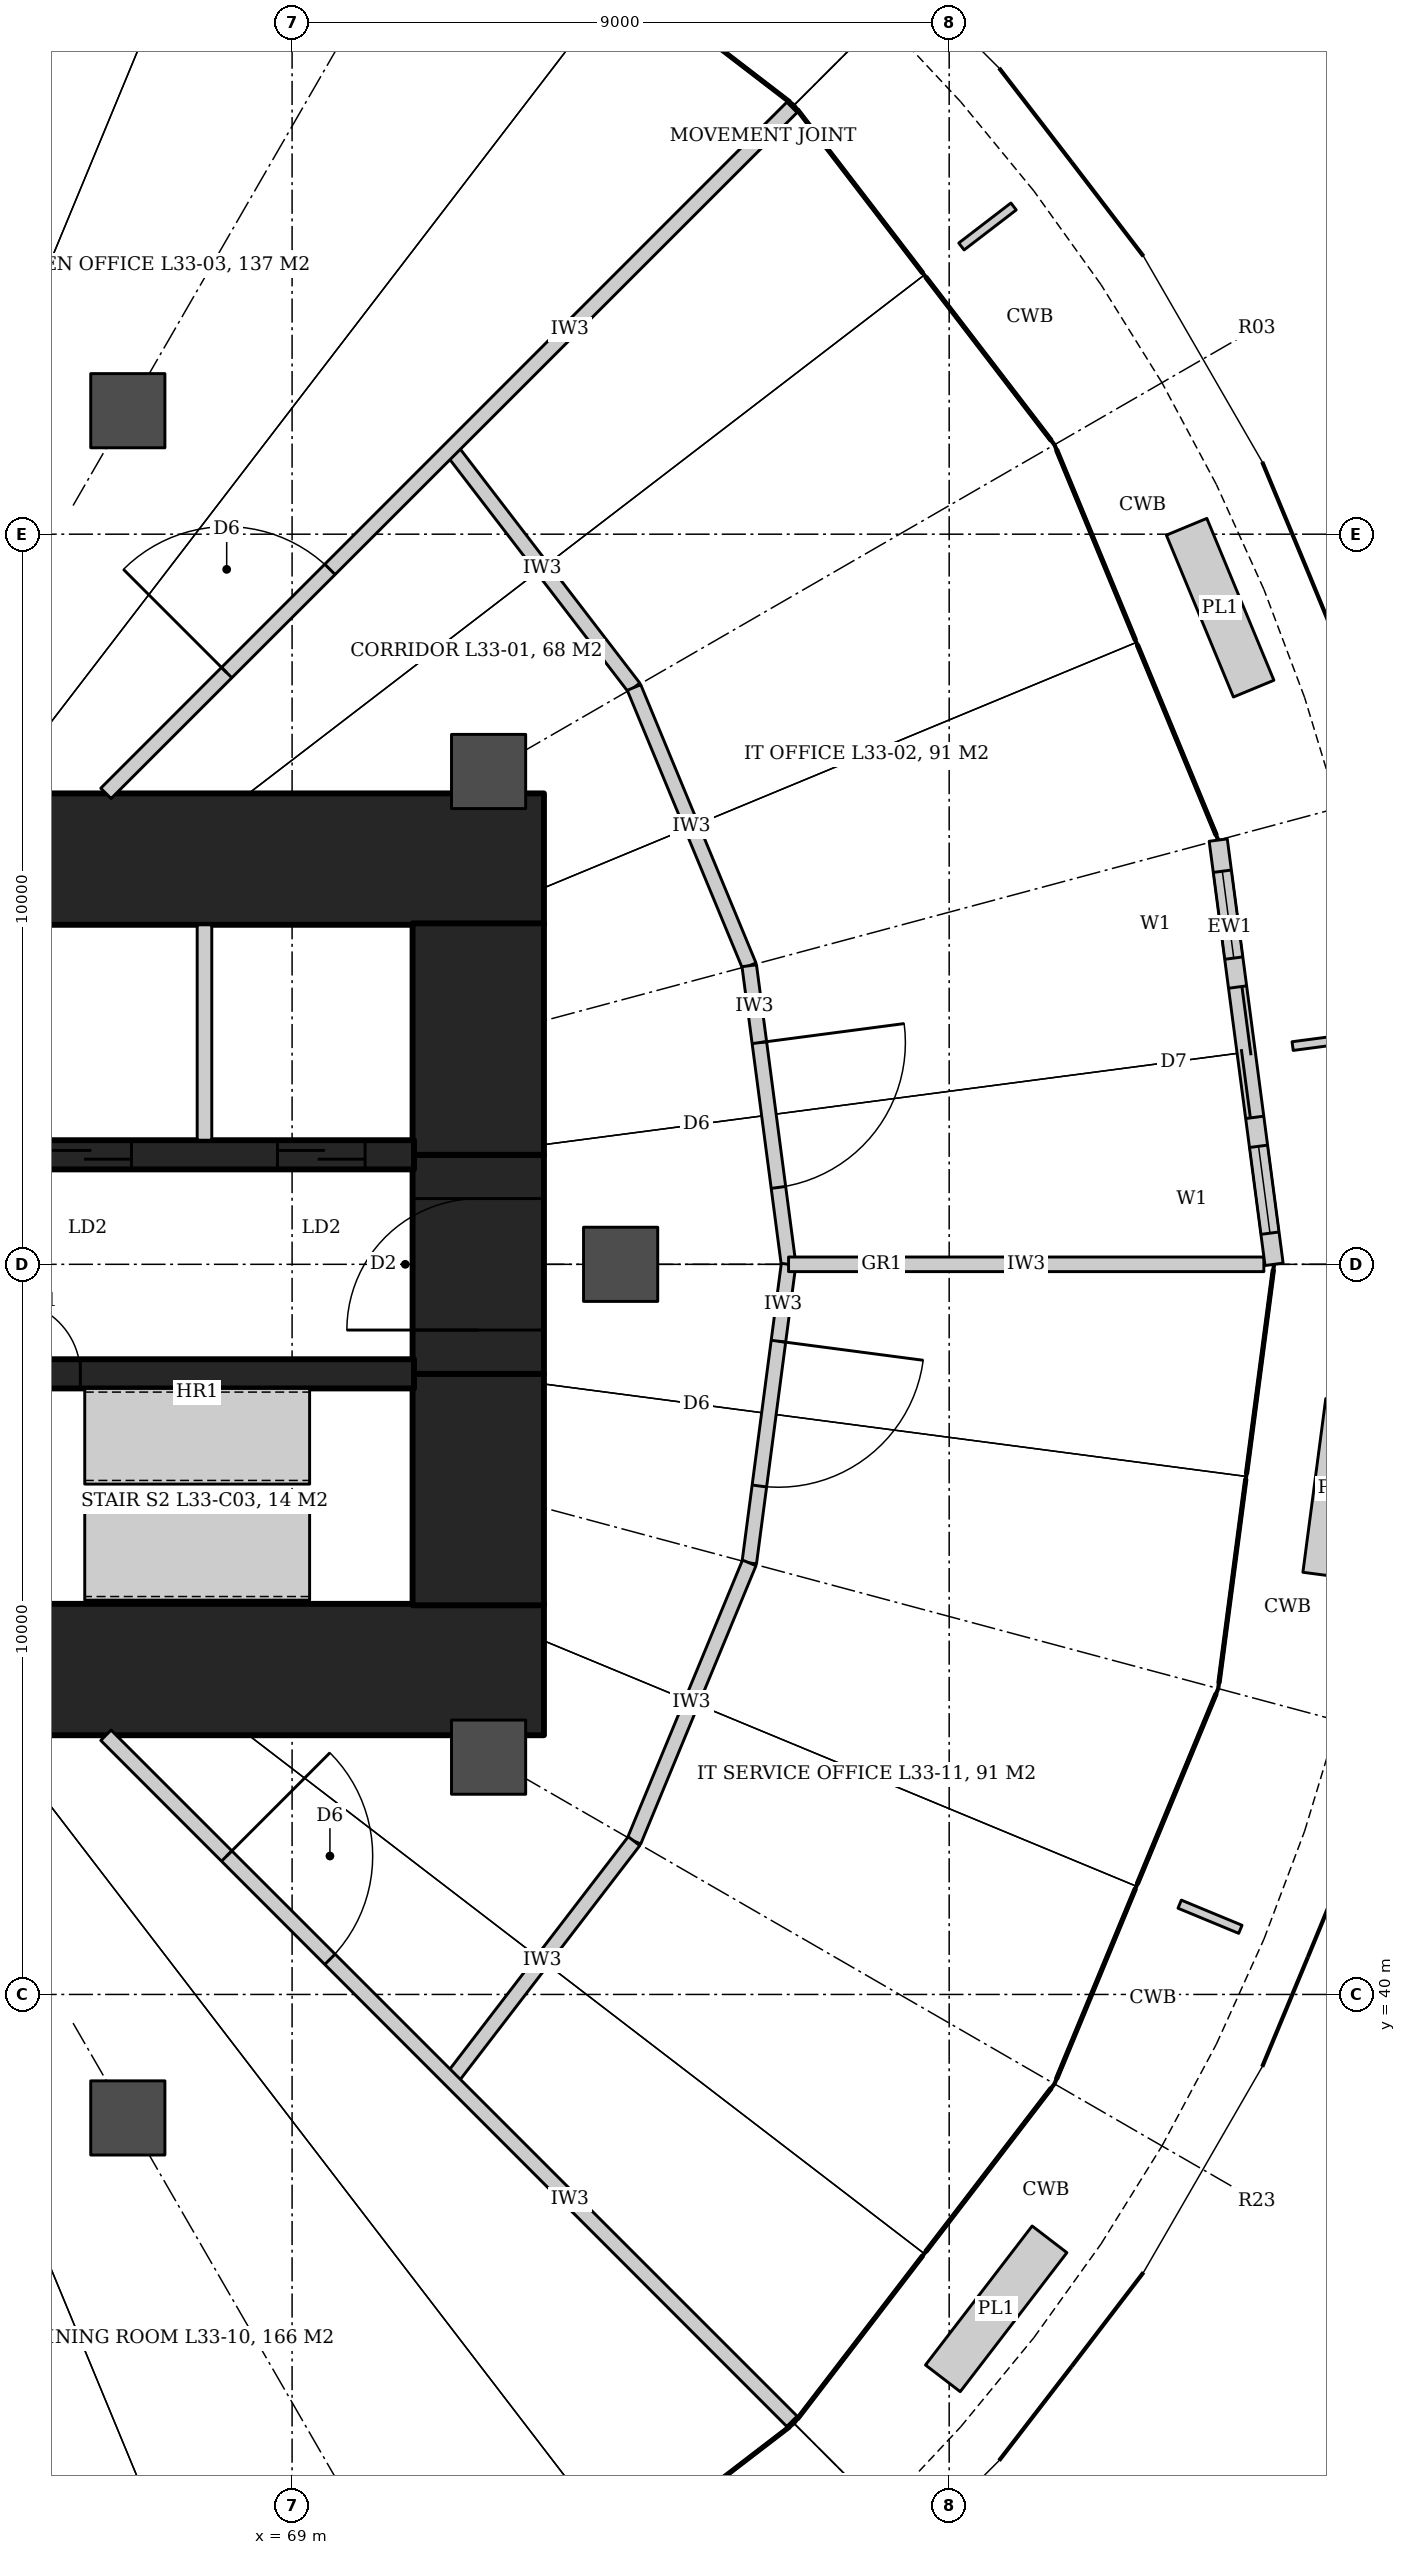
"""IFC4 building model, lengths in metres.
Left out: names, types, materials, properties, quantities, classifications, styles, units other than length and angle.
Written with IfcOpenShell. Run it as: python <this file> out.ifc"""

import sys

from ifc_helpers import new_model, si_unit, direction, frame, frame_2d, origin, origin_2d, place, context, subcontext, project, spatial, rectangle, hollow_circle, extrude, element, fill, save


model = new_model("IFC4")
c1 = context("Model", 3, precision=1e-05, world=origin(), true_north=direction((0.0, 1.0)))
c2 = subcontext(c1, "Body", "Model", "MODEL_VIEW")
j1 = project(units=[si_unit("LENGTHUNIT", "METRE"), si_unit("PLANEANGLEUNIT", "RADIAN")], contexts=[c1])
p1 = place(None, origin())
s1 = spatial("IfcSite", under=j1, at=p1, CompositionType="ELEMENT")
p2 = place(p1, origin())
s2 = spatial("IfcBuilding", under=s1, at=p2, CompositionType="ELEMENT")
p3 = place(p2, frame((0.0, 0.0, 147.8)))
s3 = spatial("IfcBuildingStorey", under=s2, at=p3, CompositionType="ELEMENT", Elevation=147.8)
for number, where, z_axis, x_axis in (
    (1, (64.6, 55.55, 0.0), (0.0, 0.0, 1.0), (1.0, 0.0, 0.0)),
    (2, (64.6, 44.45, 0.0), (0.0, 0.0, 1.0), (1.0, 0.0, 0.0)),
):
    element("IfcWall", number, at=place(p3, frame(where, z_axis=z_axis, x_axis=x_axis)), inside=s3, PredefinedType="SHEAR", context=c2, shape_type="SweptSolid", body=[
        extrude(rectangle(XDim=7.85, YDim=1.8, at=frame_2d((3.925, 0.0))), origin(), (0.0, 0.0, 1.0), 4.2),
    ])
p4 = place(p3, frame((71.55, 45.33, 0.0), z_axis=(0.0, 0.0, 1.0), x_axis=(0.0, 1.0, 0.0)))
e3 = element("IfcWall", 3, at=p4, inside=s3, PredefinedType="SHEAR", context=c2, shape_type="SweptSolid", body=[
    extrude(rectangle(XDim=3.17, YDim=1.8, at=frame_2d((1.585, 0.0))), origin(), (0.0, 0.0, 1.0), 4.2),
])
p5 = place(p3, frame((71.55, 48.5, 0.0), z_axis=(0.0, 0.0, 1.0), x_axis=(0.0, 1.0, 0.0)))
e4 = element("IfcWall", 4, at=p5, inside=s3, PredefinedType="SHEAR", context=c2, shape_type="SweptSolid", body=[
    extrude(rectangle(XDim=3.0, YDim=1.8, at=frame_2d((1.5, 0.0))), origin(), (0.0, 0.0, 1.0), 4.2),
])
p6 = place(p5, frame((0.6, 0.0, 0.0)))
e5 = element("IfcOpeningElement", 5, at=p6, cuts=e4, PredefinedType="OPENING", context=c2, shape_type="SweptSolid", body=[
    extrude(rectangle(XDim=1.8, YDim=2.1, at=frame_2d((0.9, 1.05))), frame((0.0, 0.91, 0.0), z_axis=(0.0, -1.0, 0.0), x_axis=(1.0, 0.0, 0.0)), (0.0, 0.0, 1.0), 1.82),
])
p7 = place(p3, frame((71.55, 51.5, 0.0), z_axis=(0.0, 0.0, 1.0), x_axis=(0.0, 1.0, 0.0)))
e6 = element("IfcWall", 6, at=p7, inside=s3, PredefinedType="SHEAR", context=c2, shape_type="SweptSolid", body=[
    extrude(rectangle(XDim=3.17, YDim=1.8, at=frame_2d((1.585, 0.0))), origin(), (0.0, 0.0, 1.0), 4.2),
])
p8 = place(p3, frame((64.6, 51.5, 0.0), z_axis=(0.0, 0.0, 1.0), x_axis=(1.0, 0.0, 0.0)))
e7 = element("IfcWall", 7, at=p8, inside=s3, PredefinedType="SHEAR", context=c2, shape_type="SweptSolid", body=[
    extrude(rectangle(XDim=6.07, YDim=0.4, at=frame_2d((3.035, 0.0))), origin(), (0.0, 0.0, 1.0), 4.2),
])
p9 = place(p8, frame((1.0, 0.0, 0.0)))
e8 = element("IfcOpeningElement", 8, at=p9, cuts=e7, PredefinedType="OPENING", context=c2, shape_type="SweptSolid", body=[
    extrude(rectangle(XDim=1.2, YDim=2.1, at=frame_2d((0.6, 1.05))), frame((0.0, 0.21, 0.0), z_axis=(0.0, -1.0, 0.0), x_axis=(1.0, 0.0, 0.0)), (0.0, 0.0, 1.0), 0.42),
])
p10 = place(p8, frame((4.2, 0.0, 0.0)))
e9 = element("IfcOpeningElement", 9, at=p10, cuts=e7, PredefinedType="OPENING", context=c2, shape_type="SweptSolid", body=[
    extrude(rectangle(XDim=1.2, YDim=2.1, at=frame_2d((0.6, 1.05))), frame((0.0, 0.21, 0.0), z_axis=(0.0, -1.0, 0.0), x_axis=(1.0, 0.0, 0.0)), (0.0, 0.0, 1.0), 0.42),
])
p11 = place(p3, frame((64.6, 48.5, 0.0), z_axis=(0.0, 0.0, 1.0), x_axis=(1.0, 0.0, 0.0)))
e10 = element("IfcWall", 10, at=p11, inside=s3, PredefinedType="SHEAR", context=c2, shape_type="SweptSolid", body=[
    extrude(rectangle(XDim=6.07, YDim=0.4, at=frame_2d((3.035, 0.0))), origin(), (0.0, 0.0, 1.0), 4.2),
])
p12 = place(p11, frame((0.5, 0.0, 0.0)))
e11 = element("IfcOpeningElement", 11, at=p12, cuts=e10, PredefinedType="OPENING", context=c2, shape_type="SweptSolid", body=[
    extrude(rectangle(XDim=1.0, YDim=2.1, at=frame_2d((0.5, 1.05))), frame((0.0, 0.21, 0.0), z_axis=(0.0, -1.0, 0.0), x_axis=(1.0, 0.0, 0.0)), (0.0, 0.0, 1.0), 0.42),
])
for number, where, z_axis, x_axis in (
    (12, (73.5, 50.0, 0.0), (0.0, 0.0, 1.0), (1.0, 0.0, 0.0)),
    (13, (71.691, 56.75, 0.0), (0.0, 0.0, 1.0), (1.0, 0.0, 0.0)),
    (14, (66.75, 61.691, 0.0), (0.0, 0.0, 1.0), (1.0, 0.0, 0.0)),
    (15, (66.75, 38.309, 0.0), (0.0, 0.0, 1.0), (1.0, 0.0, 0.0)),
    (16, (71.691, 43.25, 0.0), (0.0, 0.0, 1.0), (1.0, 0.0, 0.0)),
):
    element("IfcColumn", number, at=place(p3, frame(where, z_axis=z_axis, x_axis=x_axis)), inside=s3, PredefinedType="COLUMN", context=c2, shape_type="SweptSolid", body=[
        extrude(hollow_circle(Radius=0.508, WallThickness=0.05, at=origin_2d()), origin(), (0.0, 0.0, 1.0), 4.2),
    ])
p13 = place(p3, frame((71.172, 61.172, 0.0), z_axis=(0.0, 0.0, 1.0), x_axis=(0.608714823874, -0.793389099494, 0.0)))
e17 = element("IfcWall", 17, at=p13, inside=s3, PredefinedType="PARTITIONING", context=c2, shape_type="SweptSolid", body=[
    extrude(rectangle(XDim=4.125, YDim=0.2, at=frame_2d((2.062, 0.0))), origin(), (0.0, 0.0, 1.0), 3.04),
])
p14 = place(p3, frame((73.683, 57.9, 0.0), z_axis=(0.0, 0.0, 1.0), x_axis=(0.382731667114, -0.923859551549, 0.0)))
e18 = element("IfcWall", 18, at=p14, inside=s3, PredefinedType="PARTITIONING", context=c2, shape_type="SweptSolid", body=[
    extrude(rectangle(XDim=4.125, YDim=0.2, at=frame_2d((2.062, 0.0))), origin(), (0.0, 0.0, 1.0), 3.04),
])
p15 = place(p3, frame((75.262, 54.089, 0.0), z_axis=(0.0, 0.0, 1.0), x_axis=(0.130515758099, -0.991446234996, 0.0)))
e19 = element("IfcWall", 19, at=p15, inside=s3, PredefinedType="PARTITIONING", context=c2, shape_type="SweptSolid", body=[
    extrude(rectangle(XDim=4.125, YDim=0.2, at=frame_2d((2.062, 0.0))), origin(), (0.0, 0.0, 1.0), 3.04),
])
p16 = place(p15, frame((1.062, 0.0, 0.0)))
e20 = element("IfcOpeningElement", 20, at=p16, cuts=e19, PredefinedType="OPENING", context=c2, shape_type="SweptSolid", body=[
    extrude(rectangle(XDim=2.0, YDim=2.1, at=frame_2d((1.0, 1.05))), frame((0.0, 0.11, 0.0), z_axis=(0.0, -1.0, 0.0), x_axis=(1.0, 0.0, 0.0)), (0.0, 0.0, 1.0), 0.22),
])
p17 = place(p3, frame((75.8, 50.0, 0.0), z_axis=(0.0, 0.0, 1.0), x_axis=(-0.130515758099, -0.991446234996, 0.0)))
e21 = element("IfcWall", 21, at=p17, inside=s3, PredefinedType="PARTITIONING", context=c2, shape_type="SweptSolid", body=[
    extrude(rectangle(XDim=4.125, YDim=0.2, at=frame_2d((2.062, 0.0))), origin(), (0.0, 0.0, 1.0), 3.04),
])
p18 = place(p17, frame((1.062, 0.0, 0.0)))
e22 = element("IfcOpeningElement", 22, at=p18, cuts=e21, PredefinedType="OPENING", context=c2, shape_type="SweptSolid", body=[
    extrude(rectangle(XDim=2.0, YDim=2.1, at=frame_2d((1.0, 1.05))), frame((0.0, 0.11, 0.0), z_axis=(0.0, -1.0, 0.0), x_axis=(1.0, 0.0, 0.0)), (0.0, 0.0, 1.0), 0.22),
])
p19 = place(p3, frame((75.262, 45.911, 0.0), z_axis=(0.0, 0.0, 1.0), x_axis=(-0.382731667114, -0.923859551549, 0.0)))
e23 = element("IfcWall", 23, at=p19, inside=s3, PredefinedType="PARTITIONING", context=c2, shape_type="SweptSolid", body=[
    extrude(rectangle(XDim=4.125, YDim=0.2, at=frame_2d((2.062, 0.0))), origin(), (0.0, 0.0, 1.0), 3.04),
])
p20 = place(p3, frame((73.683, 42.1, 0.0), z_axis=(0.0, 0.0, 1.0), x_axis=(-0.608714823874, -0.793389099494, 0.0)))
e24 = element("IfcWall", 24, at=p20, inside=s3, PredefinedType="PARTITIONING", context=c2, shape_type="SweptSolid", body=[
    extrude(rectangle(XDim=4.125, YDim=0.2, at=frame_2d((2.062, 0.0))), origin(), (0.0, 0.0, 1.0), 3.04),
])
p21 = place(p3, frame((75.8, 50.0, 0.0), z_axis=(0.0, 0.0, 1.0), x_axis=(1.0, 0.0, 0.0)))
e25 = element("IfcWall", 25, at=p21, inside=s3, PredefinedType="PARTITIONING", context=c2, shape_type="SweptSolid", body=[
    extrude(rectangle(XDim=6.51, YDim=0.2, at=frame_2d((3.255, 0.0))), origin(), (0.0, 0.0, 1.0), 3.04),
])
p22 = place(p3, frame((66.45, 56.45, 0.0), z_axis=(0.0, 0.0, 1.0), x_axis=(0.707106781187, 0.707106781187, 0.0)))
e26 = element("IfcWall", 26, at=p22, inside=s3, PredefinedType="PARTITIONING", context=c2, shape_type="SweptSolid", body=[
    extrude(rectangle(XDim=13.288, YDim=0.2, at=frame_2d((6.644, 0.0))), origin(), (0.0, 0.0, 1.0), 3.02),
])
p23 = place(p22, frame((2.339, 0.0, 0.0)))
e27 = element("IfcOpeningElement", 27, at=p23, cuts=e26, PredefinedType="OPENING", context=c2, shape_type="SweptSolid", body=[
    extrude(rectangle(XDim=2.0, YDim=2.1, at=frame_2d((1.0, 1.05))), frame((0.0, 0.11, 0.0), z_axis=(0.0, -1.0, 0.0), x_axis=(1.0, 0.0, 0.0)), (0.0, 0.0, 1.0), 0.22),
])
p24 = place(p3, frame((66.45, 43.55, 0.0), z_axis=(0.0, 0.0, 1.0), x_axis=(0.707106781187, -0.707106781187, 0.0)))
e28 = element("IfcWall", 28, at=p24, inside=s3, PredefinedType="PARTITIONING", context=c2, shape_type="SweptSolid", body=[
    extrude(rectangle(XDim=13.288, YDim=0.2, at=frame_2d((6.644, 0.0))), origin(), (0.0, 0.0, 1.0), 3.02),
])
p25 = place(p24, frame((2.339, 0.0, 0.0)))
e29 = element("IfcOpeningElement", 29, at=p25, cuts=e28, PredefinedType="OPENING", context=c2, shape_type="SweptSolid", body=[
    extrude(rectangle(XDim=2.0, YDim=2.1, at=frame_2d((1.0, 1.05))), frame((0.0, 0.11, 0.0), z_axis=(0.0, -1.0, 0.0), x_axis=(1.0, 0.0, 0.0)), (0.0, 0.0, 1.0), 0.22),
])
p26 = place(p3, frame((82.45, 50.0, 0.0), z_axis=(0.0, 0.0, 1.0), x_axis=(-0.130512702292, 0.991446637263, 0.0)))
e30 = element("IfcWall", 30, at=p26, inside=s3, PredefinedType="SOLIDWALL", context=c2, shape_type="SweptSolid", body=[
    extrude(rectangle(XDim=5.861, YDim=0.25, at=frame_2d((2.93, 0.0))), origin(), (0.0, 0.0, 1.0), 4.04),
])
p27 = place(p26, frame((2.03, 0.0, 0.0)))
e31 = element("IfcOpeningElement", 31, at=p27, cuts=e30, PredefinedType="OPENING", context=c2, shape_type="SweptSolid", body=[
    extrude(rectangle(XDim=1.8, YDim=2.4, at=frame_2d((0.9, 1.2))), frame((0.0, 0.135, 0.0), z_axis=(0.0, -1.0, 0.0), x_axis=(1.0, 0.0, 0.0)), (0.0, 0.0, 1.0), 0.27),
])
p28 = place(p26, frame((0.43, 0.0, 0.0)))
e32 = element("IfcOpeningElement", 32, at=p28, cuts=e30, PredefinedType="OPENING", context=c2, shape_type="SweptSolid", body=[
    extrude(rectangle(XDim=1.2, YDim=2.4, at=frame_2d((0.6, 1.2))), frame((0.0, 0.135, 0.0), z_axis=(0.0, -1.0, 0.0), x_axis=(1.0, 0.0, 0.0)), (0.0, 0.0, 1.0), 0.27),
])
p29 = place(p26, frame((4.23, 0.0, 0.0)))
e33 = element("IfcOpeningElement", 33, at=p29, cuts=e30, PredefinedType="OPENING", context=c2, shape_type="SweptSolid", body=[
    extrude(rectangle(XDim=1.2, YDim=2.4, at=frame_2d((0.6, 1.2))), frame((0.0, 0.135, 0.0), z_axis=(0.0, -1.0, 0.0), x_axis=(1.0, 0.0, 0.0)), (0.0, 0.0, 1.0), 0.27),
])
p30 = place(p3, frame((67.8, 51.7, 0.0), z_axis=(0.0, 0.0, 1.0), x_axis=(0.0, 1.0, 0.0)))
e34 = element("IfcWall", 34, at=p30, inside=s3, PredefinedType="PARTITIONING", context=c2, shape_type="SweptSolid", body=[
    extrude(rectangle(XDim=2.95, YDim=0.2, at=frame_2d((1.475, 0.0))), origin(), (0.0, 0.0, 1.0), 4.2),
])
p31 = place(p16, origin())
e35 = element("IfcDoor", 35, at=p31, inside=s3, OperationType="DOUBLE_DOOR_DOUBLE_SWING", PredefinedType="DOOR", context=c2, shape_type="SweptSolid", body=[
    extrude(rectangle(XDim=2.0, YDim=2.1, at=frame_2d((1.0, 1.05))), frame((0.0, 0.025, 0.0), z_axis=(0.0, -1.0, 0.0), x_axis=(1.0, 0.0, 0.0)), (0.0, 0.0, 1.0), 0.05),
])
fill(e20, e35)
p32 = place(p23, origin())
e36 = element("IfcDoor", 36, at=p32, inside=s3, OperationType="DOUBLE_DOOR_DOUBLE_SWING", PredefinedType="DOOR", context=c2, shape_type="SweptSolid", body=[
    extrude(rectangle(XDim=2.0, YDim=2.1, at=frame_2d((1.0, 1.05))), frame((0.0, 0.025, 0.0), z_axis=(0.0, -1.0, 0.0), x_axis=(1.0, 0.0, 0.0)), (0.0, 0.0, 1.0), 0.05),
])
fill(e27, e36)
p33 = place(p25, origin())
e37 = element("IfcDoor", 37, at=p33, inside=s3, OperationType="DOUBLE_DOOR_DOUBLE_SWING", PredefinedType="DOOR", context=c2, shape_type="SweptSolid", body=[
    extrude(rectangle(XDim=2.0, YDim=2.1, at=frame_2d((1.0, 1.05))), frame((0.0, 0.025, 0.0), z_axis=(0.0, -1.0, 0.0), x_axis=(1.0, 0.0, 0.0)), (0.0, 0.0, 1.0), 0.05),
])
fill(e29, e37)
p34 = place(p18, origin())
e38 = element("IfcDoor", 38, at=p34, inside=s3, OperationType="DOUBLE_DOOR_DOUBLE_SWING", PredefinedType="DOOR", context=c2, shape_type="SweptSolid", body=[
    extrude(rectangle(XDim=2.0, YDim=2.1, at=frame_2d((1.0, 1.05))), frame((0.0, 0.025, 0.0), z_axis=(0.0, -1.0, 0.0), x_axis=(1.0, 0.0, 0.0)), (0.0, 0.0, 1.0), 0.05),
])
fill(e22, e38)
p35 = place(p27, origin())
e39 = element("IfcDoor", 39, at=p35, inside=s3, OperationType="DOUBLE_DOOR_SLIDING", PredefinedType="DOOR", context=c2, shape_type="SweptSolid", body=[
    extrude(rectangle(XDim=1.8, YDim=2.4, at=frame_2d((0.9, 1.2))), frame((0.0, 0.025, 0.0), z_axis=(0.0, -1.0, 0.0), x_axis=(1.0, 0.0, 0.0)), (0.0, 0.0, 1.0), 0.05),
])
fill(e31, e39)
p36 = place(p28, origin())
e40 = element("IfcWindow", 40, at=p36, inside=s3, PartitioningType="SINGLE_PANEL", PredefinedType="WINDOW", context=c2, shape_type="SweptSolid", body=[
    extrude(rectangle(XDim=1.2, YDim=2.4, at=frame_2d((0.6, 1.2))), frame((0.0, 0.03, 0.0), z_axis=(0.0, -1.0, 0.0), x_axis=(1.0, 0.0, 0.0)), (0.0, 0.0, 1.0), 0.06),
])
fill(e32, e40)
p37 = place(p29, origin())
e41 = element("IfcWindow", 41, at=p37, inside=s3, PartitioningType="SINGLE_PANEL", PredefinedType="WINDOW", context=c2, shape_type="SweptSolid", body=[
    extrude(rectangle(XDim=1.2, YDim=2.4, at=frame_2d((0.6, 1.2))), frame((0.0, 0.03, 0.0), z_axis=(0.0, -1.0, 0.0), x_axis=(1.0, 0.0, 0.0)), (0.0, 0.0, 1.0), 0.06),
])
fill(e33, e41)
p38 = place(p12, origin())
e42 = element("IfcDoor", 42, at=p38, inside=s3, OperationType="SINGLE_SWING_LEFT", PredefinedType="DOOR", context=c2, shape_type="SweptSolid", body=[
    extrude(rectangle(XDim=1.0, YDim=2.1, at=frame_2d((0.5, 1.05))), frame((0.0, 0.025, 0.0), z_axis=(0.0, -1.0, 0.0), x_axis=(1.0, 0.0, 0.0)), (0.0, 0.0, 1.0), 0.05),
])
fill(e11, e42)
p39 = place(p9, origin())
e43 = element("IfcDoor", 43, at=p39, inside=s3, OperationType="SLIDING_TO_LEFT", PredefinedType="DOOR", context=c2, shape_type="SweptSolid", body=[
    extrude(rectangle(XDim=1.2, YDim=2.1, at=frame_2d((0.6, 1.05))), frame((0.0, 0.025, 0.0), z_axis=(0.0, -1.0, 0.0), x_axis=(1.0, 0.0, 0.0)), (0.0, 0.0, 1.0), 0.05),
])
fill(e8, e43)
p40 = place(p10, origin())
e44 = element("IfcDoor", 44, at=p40, inside=s3, OperationType="SLIDING_TO_LEFT", PredefinedType="DOOR", context=c2, shape_type="SweptSolid", body=[
    extrude(rectangle(XDim=1.2, YDim=2.1, at=frame_2d((0.6, 1.05))), frame((0.0, 0.025, 0.0), z_axis=(0.0, -1.0, 0.0), x_axis=(1.0, 0.0, 0.0)), (0.0, 0.0, 1.0), 0.05),
])
fill(e9, e44)
p41 = place(p6, origin())
e45 = element("IfcDoor", 45, at=p41, inside=s3, OperationType="DOUBLE_DOOR_DOUBLE_SWING", PredefinedType="DOOR", context=c2, shape_type="SweptSolid", body=[
    extrude(rectangle(XDim=1.8, YDim=2.1, at=frame_2d((0.9, 1.05))), frame((0.0, 0.025, 0.0), z_axis=(0.0, -1.0, 0.0), x_axis=(1.0, 0.0, 0.0)), (0.0, 0.0, 1.0), 0.05),
])
fill(e5, e45)
save(model, sys.argv[1])
